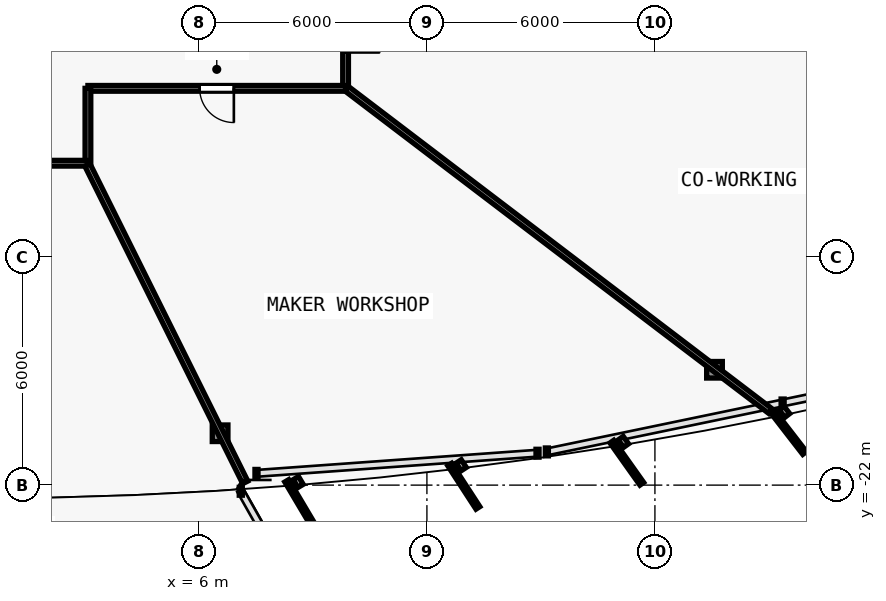
"""IFC4 building model, lengths in metres.
Left out: names, types, materials, properties, quantities, classifications, styles, units other than length and angle.
Written with IfcOpenShell. Run it as: python <this file> out.ifc"""

import sys

from ifc_helpers import new_model, si_unit, direction, frame, frame_2d, origin, origin_2d, place, context, subcontext, project, spatial, rectangle, i_section, extrude, element, fill, save


model = new_model("IFC4")
c1 = context("Model", 3, precision=1e-05, world=origin(), true_north=direction((0.0, 1.0)))
c2 = subcontext(c1, "Body", "Model", "MODEL_VIEW")
j1 = project(units=[si_unit("LENGTHUNIT", "METRE"), si_unit("PLANEANGLEUNIT", "RADIAN")], contexts=[c1])
p1 = place(None, origin())
s1 = spatial("IfcSite", under=j1, at=p1, CompositionType="ELEMENT")
p2 = place(p1, origin())
s2 = spatial("IfcBuilding", under=s1, at=p2, CompositionType="ELEMENT")
p3 = place(p2, frame((0.0, 0.0, 66.0)))
s3 = spatial("IfcBuildingStorey", under=s2, at=p3, CompositionType="ELEMENT", Elevation=66.0)
p4 = place(p3, frame((6.558, -20.635, 0.006), z_axis=(-0.006934288159, 0.035283289748, 0.999353293441), x_axis=(-0.981229659911, -0.192842823335, 0.0)))
e1 = element("IfcColumn", 1, at=p4, inside=s3, PredefinedType="COLUMN", context=c2, shape_type="SweptSolid", body=[
    extrude(i_section(OverallWidth=0.412, OverallDepth=0.435, WebThickness=0.023, FlangeThickness=0.037, FilletRadius=0.015, at=origin_2d()), origin(), (0.0, 0.0, 1.0), 3.591),
])
p5 = place(p3, frame((19.568, -18.965, 0.006), z_axis=(-0.020596292833, 0.033511459955, 0.999226087917), x_axis=(-0.851954850327, -0.523615252838, 0.0)))
e2 = element("IfcColumn", 2, at=p5, inside=s3, PredefinedType="COLUMN", context=c2, shape_type="SweptSolid", body=[
    extrude(i_section(OverallWidth=0.412, OverallDepth=0.435, WebThickness=0.023, FlangeThickness=0.037, FilletRadius=0.015, at=origin_2d()), origin(), (0.0, 0.0, 1.0), 3.592),
])
p6 = place(p3, frame((9.86, 8.426, 0.0), z_axis=(0.0, 0.0, 1.0), x_axis=(0.0, -1.0, 0.0)))
e3 = element("IfcWall", 3, at=p6, inside=s3, PredefinedType="PARTITIONING", context=c2, shape_type="SweptSolid", body=[
    extrude(rectangle(XDim=19.986, YDim=0.15, at=frame_2d((9.993, 0.0))), origin(), (0.0, 0.0, 1.0), 2.609),
])
p7 = place(p6, frame((18.142, 0.0, 0.0)))
e4 = element("IfcOpeningElement", 4, at=p7, cuts=e3, PredefinedType="OPENING", context=c2, shape_type="SweptSolid", body=[
    extrude(rectangle(XDim=0.9, YDim=2.1, at=frame_2d((0.45, 1.05))), frame((0.0, 0.085, 0.0), z_axis=(0.0, -1.0, 0.0), x_axis=(1.0, 0.0, 0.0)), (0.0, 0.0, 1.0), 0.17),
])
p8 = place(p6, frame((14.362, 0.0, 0.0)))
e5 = element("IfcOpeningElement", 5, at=p8, cuts=e3, PredefinedType="OPENING", context=c2, shape_type="SweptSolid", body=[
    extrude(rectangle(XDim=0.9, YDim=2.1, at=frame_2d((0.45, 1.05))), frame((0.0, 0.085, 0.0), z_axis=(0.0, -1.0, 0.0), x_axis=(1.0, 0.0, 0.0)), (0.0, 0.0, 1.0), 0.17),
])
p9 = place(p6, frame((9.744, 0.0, 0.0)))
e6 = element("IfcOpeningElement", 6, at=p9, cuts=e3, PredefinedType="OPENING", context=c2, shape_type="SweptSolid", body=[
    extrude(rectangle(XDim=0.9, YDim=2.1, at=frame_2d((0.45, 1.05))), frame((0.0, 0.085, 0.0), z_axis=(0.0, -1.0, 0.0), x_axis=(1.0, 0.0, 0.0)), (0.0, 0.0, 1.0), 0.17),
])
p10 = place(p6, frame((5.604, 0.0, 0.0)))
e7 = element("IfcOpeningElement", 7, at=p10, cuts=e3, PredefinedType="OPENING", context=c2, shape_type="SweptSolid", body=[
    extrude(rectangle(XDim=0.9, YDim=2.1, at=frame_2d((0.45, 1.05))), frame((0.0, 0.085, 0.0), z_axis=(0.0, -1.0, 0.0), x_axis=(1.0, 0.0, 0.0)), (0.0, 0.0, 1.0), 0.17),
])
p11 = place(p6, frame((1.622, 0.0, 0.0)))
e8 = element("IfcOpeningElement", 8, at=p11, cuts=e3, PredefinedType="OPENING", context=c2, shape_type="SweptSolid", body=[
    extrude(rectangle(XDim=0.9, YDim=2.1, at=frame_2d((0.45, 1.05))), frame((0.0, 0.085, 0.0), z_axis=(0.0, -1.0, 0.0), x_axis=(1.0, 0.0, 0.0)), (0.0, 0.0, 1.0), 0.17),
])
p12 = place(p3, frame((9.86, -11.56, 0.0), z_axis=(0.0, 0.0, 1.0), x_axis=(-1.0, 0.0, 0.0)))
e9 = element("IfcWall", 9, at=p12, inside=s3, PredefinedType="PARTITIONING", context=c2, shape_type="SweptSolid", body=[
    extrude(rectangle(XDim=6.78, YDim=0.15, at=frame_2d((3.39, 0.0))), origin(), (0.0, 0.0, 1.0), 3.35),
])
p13 = place(p12, frame((2.94, 0.0, 0.0)))
e10 = element("IfcOpeningElement", 10, at=p13, cuts=e9, PredefinedType="OPENING", context=c2, shape_type="SweptSolid", body=[
    extrude(rectangle(XDim=0.9, YDim=2.1, at=frame_2d((0.45, 1.05))), frame((0.0, 0.085, 0.0), z_axis=(0.0, -1.0, 0.0), x_axis=(1.0, 0.0, 0.0)), (0.0, 0.0, 1.0), 0.17),
])
p14 = place(p3, frame((3.08, -11.56, 0.0), z_axis=(0.0, 0.0, 1.0), x_axis=(0.0, -1.0, 0.0)))
e11 = element("IfcWall", 11, at=p14, inside=s3, PredefinedType="PARTITIONING", context=c2, shape_type="SweptSolid", body=[
    extrude(rectangle(XDim=1.97, YDim=0.15, at=frame_2d((0.985, 0.0))), origin(), (0.0, 0.0, 1.0), 2.925),
])
p15 = place(p3, frame((3.08, -13.53, 0.0), z_axis=(0.0, 0.0, 1.0), x_axis=(-1.0, 0.0, 0.0)))
e12 = element("IfcWall", 12, at=p15, inside=s3, PredefinedType="PARTITIONING", context=c2, shape_type="SweptSolid", body=[
    extrude(rectangle(XDim=6.16, YDim=0.15, at=frame_2d((3.08, 0.0))), origin(), (0.0, 0.0, 1.0), 2.725),
])
p16 = place(p15, frame((2.63, 0.0, 0.0)))
e13 = element("IfcOpeningElement", 13, at=p16, cuts=e12, PredefinedType="OPENING", context=c2, shape_type="SweptSolid", body=[
    extrude(rectangle(XDim=0.9, YDim=2.1, at=frame_2d((0.45, 1.05))), frame((0.0, 0.085, 0.0), z_axis=(0.0, -1.0, 0.0), x_axis=(1.0, 0.0, 0.0)), (0.0, 0.0, 1.0), 0.17),
])
p17 = place(p3, frame((3.066, -13.573, 0.0), z_axis=(0.0, 0.0, 1.0), x_axis=(0.445213283885, -0.89542455397, 0.0)))
e14 = element("IfcWall", 14, at=p17, inside=s3, PredefinedType="PARTITIONING", context=c2, shape_type="SweptSolid", body=[
    extrude(rectangle(XDim=9.33, YDim=0.15, at=frame_2d((4.665, 0.0))), origin(), (0.0, 0.0, 1.0), 2.725),
])
p18 = place(p3, frame((9.888, -11.569, 0.0), z_axis=(0.0, 0.0, 1.0), x_axis=(0.795860269097, -0.605480331698, 0.0)))
e15 = element("IfcWall", 15, at=p18, inside=s3, PredefinedType="PARTITIONING", context=c2, shape_type="SweptSolid", body=[
    extrude(rectangle(XDim=14.013, YDim=0.15, at=frame_2d((7.006, 0.0))), origin(), (0.0, 0.0, 1.0), 2.725),
])
p19 = place(p13, origin())
e16 = element("IfcDoor", 16, at=p19, inside=s3, OperationType="SINGLE_SWING_LEFT", PredefinedType="DOOR", context=c2, shape_type="SweptSolid", body=[
    extrude(rectangle(XDim=0.9, YDim=2.1, at=frame_2d((0.45, 1.05))), frame((0.0, 0.025, 0.0), z_axis=(0.0, -1.0, 0.0), x_axis=(1.0, 0.0, 0.0)), (0.0, 0.0, 1.0), 0.05),
])
fill(e10, e16)
save(model, sys.argv[1])
